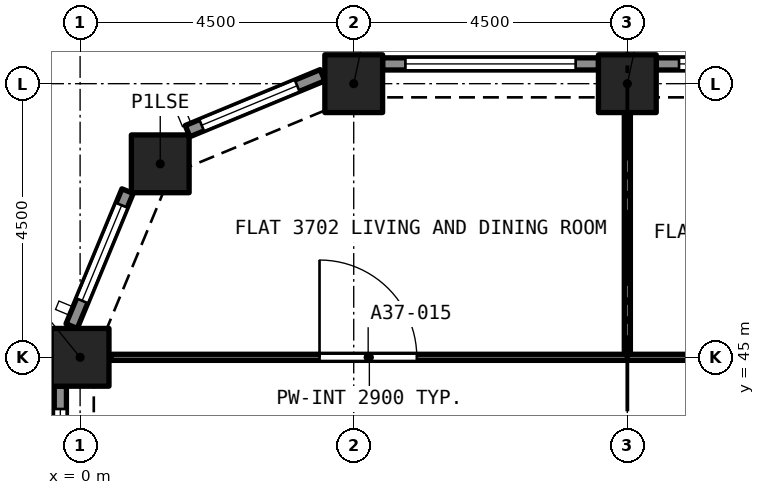
"""IFC4 building model, lengths in metres.
Left out: names, types, materials, properties, quantities, classifications, styles, units other than length and angle.
Written with IfcOpenShell. Run it as: python <this file> out.ifc"""

import sys

from ifc_helpers import new_model, si_unit, direction, frame, frame_2d, origin, origin_2d, place, context, subcontext, project, spatial, rectangle, extrude, element, fill, save


model = new_model("IFC4")
c1 = context("Model", 3, precision=1e-05, world=origin(), true_north=direction((0.0, 1.0)))
c2 = subcontext(c1, "Body", "Model", "MODEL_VIEW")
j1 = project(units=[si_unit("LENGTHUNIT", "METRE"), si_unit("PLANEANGLEUNIT", "RADIAN")], contexts=[c1])
p1 = place(None, origin())
s1 = spatial("IfcSite", under=j1, at=p1, CompositionType="ELEMENT")
p2 = place(p1, origin())
s2 = spatial("IfcBuilding", under=s1, at=p2, CompositionType="ELEMENT")
p3 = place(p2, frame((0.0, 0.0, 133.4)))
s3 = spatial("IfcBuildingStorey", under=s2, at=p3, CompositionType="ELEMENT", Elevation=133.4)
for number, where, z_axis, x_axis in (
    (1, (0.0, 45.0, 0.0), (0.0, 0.0, 1.0), (1.0, 0.0, 0.0)),
    (2, (1.318, 48.182, 0.0), (0.0, 0.0, 1.0), (1.0, 0.0, 0.0)),
    (3, (4.5, 49.5, 0.0), (0.0, 0.0, 1.0), (1.0, 0.0, 0.0)),
    (4, (9.0, 49.5, 0.0), (0.0, 0.0, 1.0), (1.0, 0.0, 0.0)),
):
    element("IfcColumn", number, at=place(p3, frame(where, z_axis=z_axis, x_axis=x_axis)), inside=s3, PredefinedType="COLUMN", context=c2, shape_type="SweptSolid", body=[
        extrude(rectangle(XDim=0.95, YDim=0.95, at=origin_2d()), origin(), (0.0, 0.0, 1.0), 3.2),
    ])
p4 = place(p3, frame((9.475, 49.825, 0.0), z_axis=(0.0, 0.0, 1.0), x_axis=(1.0, 0.0, 0.0)))
e5 = element("IfcWall", 5, at=p4, inside=s3, PredefinedType="SOLIDWALL", context=c2, shape_type="SweptSolid", body=[
    extrude(rectangle(XDim=3.55, YDim=0.2, at=frame_2d((1.775, 0.0))), origin(), (0.0, 0.0, 1.0), 3.2),
])
p5 = place(p4, frame((0.375, 0.0, 0.45)))
e6 = element("IfcOpeningElement", 6, at=p5, cuts=e5, PredefinedType="OPENING", context=c2, shape_type="SweptSolid", body=[
    extrude(rectangle(XDim=2.8, YDim=1.95, at=frame_2d((1.4, 0.975))), frame((0.0, 0.11, 0.0), z_axis=(0.0, -1.0, 0.0), x_axis=(1.0, 0.0, 0.0)), (0.0, 0.0, 1.0), 0.22),
])
p6 = place(p3, frame((4.975, 49.825, 0.0), z_axis=(0.0, 0.0, 1.0), x_axis=(1.0, 0.0, 0.0)))
e7 = element("IfcWall", 7, at=p6, inside=s3, PredefinedType="SOLIDWALL", context=c2, shape_type="SweptSolid", body=[
    extrude(rectangle(XDim=3.55, YDim=0.2, at=frame_2d((1.775, 0.0))), origin(), (0.0, 0.0, 1.0), 3.2),
])
p7 = place(p6, frame((0.375, 0.0, 0.45)))
e8 = element("IfcOpeningElement", 8, at=p7, cuts=e7, PredefinedType="OPENING", context=c2, shape_type="SweptSolid", body=[
    extrude(rectangle(XDim=2.8, YDim=1.95, at=frame_2d((1.4, 0.975))), frame((0.0, 0.11, 0.0), z_axis=(0.0, -1.0, 0.0), x_axis=(1.0, 0.0, 0.0)), (0.0, 0.0, 1.0), 0.22),
])
p8 = place(p3, frame((1.767, 48.72, 0.0), z_axis=(0.0, 0.0, 1.0), x_axis=(0.923880599843, 0.382680855588, 0.0)))
e9 = element("IfcWall", 9, at=p8, inside=s3, PredefinedType="SOLIDWALL", context=c2, shape_type="SweptSolid", body=[
    extrude(rectangle(XDim=2.403, YDim=0.2, at=frame_2d((1.201, 0.0))), origin(), (0.0, 0.0, 1.0), 3.2),
])
p9 = place(p8, frame((0.251, 0.0, 0.45)))
e10 = element("IfcOpeningElement", 10, at=p9, cuts=e9, PredefinedType="OPENING", context=c2, shape_type="SweptSolid", body=[
    extrude(rectangle(XDim=1.7, YDim=1.95, at=frame_2d((0.85, 0.975))), frame((0.0, 0.11, 0.0), z_axis=(0.0, -1.0, 0.0), x_axis=(1.0, 0.0, 0.0)), (0.0, 0.0, 1.0), 0.22),
])
p10 = place(p3, frame((-0.139, 45.513, 0.0), z_axis=(0.0, 0.0, 1.0), x_axis=(0.382680855588, 0.923880599843, 0.0)))
e11 = element("IfcWall", 11, at=p10, inside=s3, PredefinedType="SOLIDWALL", context=c2, shape_type="SweptSolid", body=[
    extrude(rectangle(XDim=2.403, YDim=0.2, at=frame_2d((1.201, 0.0))), origin(), (0.0, 0.0, 1.0), 3.2),
])
p11 = place(p10, frame((0.451, 0.0, 0.45)))
e12 = element("IfcOpeningElement", 12, at=p11, cuts=e11, PredefinedType="OPENING", context=c2, shape_type="SweptSolid", body=[
    extrude(rectangle(XDim=1.7, YDim=1.95, at=frame_2d((0.85, 0.975))), frame((0.0, 0.11, 0.0), z_axis=(0.0, -1.0, 0.0), x_axis=(1.0, 0.0, 0.0)), (0.0, 0.0, 1.0), 0.22),
])
p12 = place(p3, frame((-0.325, 40.975, 0.0), z_axis=(0.0, 0.0, 1.0), x_axis=(0.0, 1.0, 0.0)))
e13 = element("IfcWall", 13, at=p12, inside=s3, PredefinedType="SOLIDWALL", context=c2, shape_type="SweptSolid", body=[
    extrude(rectangle(XDim=3.55, YDim=0.2, at=frame_2d((1.775, 0.0))), origin(), (0.0, 0.0, 1.0), 3.2),
])
p13 = place(p12, frame((0.375, 0.0, 0.45)))
e14 = element("IfcOpeningElement", 14, at=p13, cuts=e13, PredefinedType="OPENING", context=c2, shape_type="SweptSolid", body=[
    extrude(rectangle(XDim=2.8, YDim=1.95, at=frame_2d((1.4, 0.975))), frame((0.0, 0.11, 0.0), z_axis=(0.0, -1.0, 0.0), x_axis=(1.0, 0.0, 0.0)), (0.0, 0.0, 1.0), 0.22),
])
p14 = place(p3, frame((9.0, 45.0, 0.0), z_axis=(0.0, 0.0, 1.0), x_axis=(1.0, 0.0, 0.0)))
e15 = element("IfcWall", 15, at=p14, inside=s3, PredefinedType="PARTITIONING", context=c2, shape_type="SweptSolid", body=[
    extrude(rectangle(XDim=4.5, YDim=0.1, at=frame_2d((2.25, 0.0))), origin(), (0.0, 0.0, 1.0), 2.9),
])
p15 = place(p14, frame((1.8, 0.0, 0.0)))
e16 = element("IfcOpeningElement", 16, at=p15, cuts=e15, PredefinedType="OPENING", context=c2, shape_type="SweptSolid", body=[
    extrude(rectangle(XDim=0.9, YDim=2.1, at=frame_2d((0.45, 1.05))), frame((0.0, 0.06, 0.0), z_axis=(0.0, -1.0, 0.0), x_axis=(1.0, 0.0, 0.0)), (0.0, 0.0, 1.0), 0.12),
])
p16 = place(p3, frame((9.0, 45.05, 0.0), z_axis=(0.0, 0.0, 1.0), x_axis=(0.0, 1.0, 0.0)))
e17 = element("IfcWall", 17, at=p16, inside=s3, PredefinedType="PARTITIONING", context=c2, shape_type="SweptSolid", body=[
    extrude(rectangle(XDim=3.975, YDim=0.1, at=frame_2d((1.987, 0.0))), origin(), (0.0, 0.0, 1.0), 2.9),
])
p17 = place(p3, frame((0.514, 45.0, 0.0), z_axis=(0.0, 0.0, 1.0), x_axis=(1.0, 0.0, 0.0)))
e18 = element("IfcWall", 18, at=p17, inside=s3, PredefinedType="PARTITIONING", context=c2, shape_type="SweptSolid", body=[
    extrude(rectangle(XDim=8.486, YDim=0.1, at=frame_2d((4.243, 0.0))), origin(), (0.0, 0.0, 1.0), 2.9),
])
p18 = place(p17, frame((3.423, 0.0, 0.0)))
e19 = element("IfcOpeningElement", 19, at=p18, cuts=e18, PredefinedType="OPENING", context=c2, shape_type="SweptSolid", body=[
    extrude(rectangle(XDim=1.6, YDim=2.1, at=frame_2d((0.8, 1.05))), frame((0.0, 0.06, 0.0), z_axis=(0.0, -1.0, 0.0), x_axis=(1.0, 0.0, 0.0)), (0.0, 0.0, 1.0), 0.12),
])
p19 = place(p5, origin())
e20 = element("IfcWindow", 20, at=p19, inside=s3, PartitioningType="SINGLE_PANEL", PredefinedType="WINDOW", context=c2, shape_type="SweptSolid", body=[
    extrude(rectangle(XDim=2.8, YDim=1.95, at=frame_2d((1.4, 0.975))), frame((0.0, 0.03, 0.0), z_axis=(0.0, -1.0, 0.0), x_axis=(1.0, 0.0, 0.0)), (0.0, 0.0, 1.0), 0.06),
])
fill(e6, e20)
p20 = place(p7, origin())
e21 = element("IfcWindow", 21, at=p20, inside=s3, PartitioningType="SINGLE_PANEL", PredefinedType="WINDOW", context=c2, shape_type="SweptSolid", body=[
    extrude(rectangle(XDim=2.8, YDim=1.95, at=frame_2d((1.4, 0.975))), frame((0.0, 0.03, 0.0), z_axis=(0.0, -1.0, 0.0), x_axis=(1.0, 0.0, 0.0)), (0.0, 0.0, 1.0), 0.06),
])
fill(e8, e21)
p21 = place(p9, origin())
e22 = element("IfcWindow", 22, at=p21, inside=s3, PartitioningType="SINGLE_PANEL", PredefinedType="WINDOW", context=c2, shape_type="SweptSolid", body=[
    extrude(rectangle(XDim=1.7, YDim=1.95, at=frame_2d((0.85, 0.975))), frame((0.0, 0.03, 0.0), z_axis=(0.0, -1.0, 0.0), x_axis=(1.0, 0.0, 0.0)), (0.0, 0.0, 1.0), 0.06),
])
fill(e10, e22)
p22 = place(p11, origin())
e23 = element("IfcWindow", 23, at=p22, inside=s3, PartitioningType="SINGLE_PANEL", PredefinedType="WINDOW", context=c2, shape_type="SweptSolid", body=[
    extrude(rectangle(XDim=1.7, YDim=1.95, at=frame_2d((0.85, 0.975))), frame((0.0, 0.03, 0.0), z_axis=(0.0, -1.0, 0.0), x_axis=(1.0, 0.0, 0.0)), (0.0, 0.0, 1.0), 0.06),
])
fill(e12, e23)
p23 = place(p13, origin())
e24 = element("IfcWindow", 24, at=p23, inside=s3, PartitioningType="SINGLE_PANEL", PredefinedType="WINDOW", context=c2, shape_type="SweptSolid", body=[
    extrude(rectangle(XDim=2.8, YDim=1.95, at=frame_2d((1.4, 0.975))), frame((0.0, 0.03, 0.0), z_axis=(0.0, -1.0, 0.0), x_axis=(1.0, 0.0, 0.0)), (0.0, 0.0, 1.0), 0.06),
])
fill(e14, e24)
p24 = place(p18, origin())
e25 = element("IfcDoor", 25, at=p24, inside=s3, OperationType="SINGLE_SWING_LEFT", PredefinedType="DOOR", context=c2, shape_type="SweptSolid", body=[
    extrude(rectangle(XDim=1.6, YDim=2.1, at=frame_2d((0.8, 1.05))), frame((0.0, 0.025, 0.0), z_axis=(0.0, -1.0, 0.0), x_axis=(1.0, 0.0, 0.0)), (0.0, 0.0, 1.0), 0.05),
])
fill(e19, e25)
save(model, sys.argv[1])
